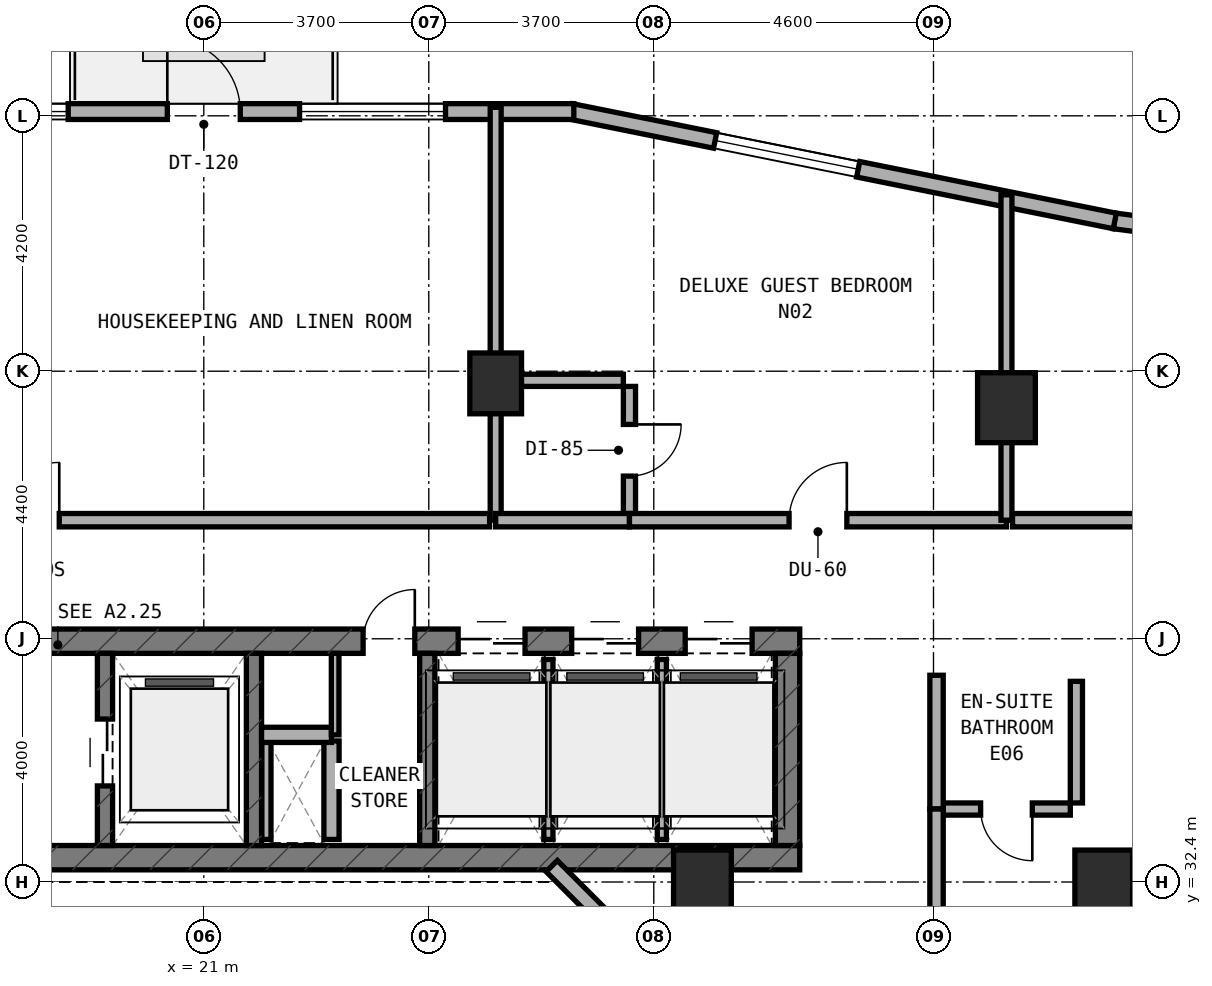
"""IFC4 building model, lengths in metres.
Left out: names, types, materials, properties, quantities, classifications, styles, units other than length and angle.
Written with IfcOpenShell. Run it as: python <this file> out.ifc"""

import sys

from ifc_helpers import new_model, si_unit, direction, frame, frame_2d, origin, origin_2d, place, context, subcontext, project, spatial, rectangle, extrude, element, fill, save


model = new_model("IFC4")
c1 = context("Model", 3, precision=1e-05, world=origin(), true_north=direction((0.0, 1.0)))
c2 = subcontext(c1, "Body", "Model", "MODEL_VIEW")
j1 = project(units=[si_unit("LENGTHUNIT", "METRE"), si_unit("PLANEANGLEUNIT", "RADIAN")], contexts=[c1])
p1 = place(None, origin())
s1 = spatial("IfcSite", under=j1, at=p1, CompositionType="ELEMENT")
p2 = place(p1, origin())
s2 = spatial("IfcBuilding", under=s1, at=p2, CompositionType="ELEMENT")
p3 = place(p2, frame((0.0, 0.0, 112.5)))
s3 = spatial("IfcBuildingStorey", under=s2, at=p3, CompositionType="ELEMENT", Elevation=112.5)
p4 = place(p3, frame((6.4, 32.8, 0.0), z_axis=(0.0, 0.0, 1.0), x_axis=(1.0, 0.0, 0.0)))
e1 = element("IfcWall", 1, at=p4, inside=s3, PredefinedType="SHEAR", context=c2, shape_type="SweptSolid", body=[
    extrude(rectangle(XDim=24.4, YDim=0.4, at=frame_2d((12.2, 0.0))), origin(), (0.0, 0.0, 1.0), 3.5),
])
p5 = place(p4, frame((6.05, 0.0, 0.0)))
e2 = element("IfcOpeningElement", 2, at=p5, cuts=e1, PredefinedType="OPENING", context=c2, shape_type="SweptSolid", body=[
    extrude(rectangle(XDim=1.1, YDim=2.15, at=frame_2d((0.55, 1.075))), frame((0.0, 0.21, 0.0), z_axis=(0.0, -1.0, 0.0), x_axis=(1.0, 0.0, 0.0)), (0.0, 0.0, 1.0), 0.42),
])
p6 = place(p3, frame((6.4, 36.36, 0.0), z_axis=(0.0, 0.0, 1.0), x_axis=(1.0, 0.0, 0.0)))
e3 = element("IfcWall", 3, at=p6, inside=s3, PredefinedType="SHEAR", context=c2, shape_type="SweptSolid", body=[
    extrude(rectangle(XDim=24.4, YDim=0.4, at=frame_2d((12.2, 0.0))), origin(), (0.0, 0.0, 1.0), 3.5),
])
p7 = place(p6, frame((9.15, 0.0, 0.0)))
e4 = element("IfcOpeningElement", 4, at=p7, cuts=e3, PredefinedType="OPENING", context=c2, shape_type="SweptSolid", body=[
    extrude(rectangle(XDim=1.2, YDim=2.15, at=frame_2d((0.6, 1.075))), frame((0.0, 0.21, 0.0), z_axis=(0.0, -1.0, 0.0), x_axis=(1.0, 0.0, 0.0)), (0.0, 0.0, 1.0), 0.42),
])
p8 = place(p6, frame((17.22, 0.0, 0.0)))
e5 = element("IfcOpeningElement", 5, at=p8, cuts=e3, PredefinedType="OPENING", context=c2, shape_type="SweptSolid", body=[
    extrude(rectangle(XDim=0.85, YDim=2.1, at=frame_2d((0.425, 1.05))), frame((0.0, 0.21, 0.0), z_axis=(0.0, -1.0, 0.0), x_axis=(1.0, 0.0, 0.0)), (0.0, 0.0, 1.0), 0.42),
])
p9 = place(p6, frame((18.783, 0.0, 0.0)))
e6 = element("IfcOpeningElement", 6, at=p9, cuts=e3, PredefinedType="OPENING", context=c2, shape_type="SweptSolid", body=[
    extrude(rectangle(XDim=1.1, YDim=2.15, at=frame_2d((0.55, 1.075))), frame((0.0, 0.21, 0.0), z_axis=(0.0, -1.0, 0.0), x_axis=(1.0, 0.0, 0.0)), (0.0, 0.0, 1.0), 0.42),
])
p10 = place(p6, frame((20.65, 0.0, 0.0)))
e7 = element("IfcOpeningElement", 7, at=p10, cuts=e3, PredefinedType="OPENING", context=c2, shape_type="SweptSolid", body=[
    extrude(rectangle(XDim=1.1, YDim=2.15, at=frame_2d((0.55, 1.075))), frame((0.0, 0.21, 0.0), z_axis=(0.0, -1.0, 0.0), x_axis=(1.0, 0.0, 0.0)), (0.0, 0.0, 1.0), 0.42),
])
p11 = place(p6, frame((22.517, 0.0, 0.0)))
e8 = element("IfcOpeningElement", 8, at=p11, cuts=e3, PredefinedType="OPENING", context=c2, shape_type="SweptSolid", body=[
    extrude(rectangle(XDim=1.1, YDim=2.15, at=frame_2d((0.55, 1.075))), frame((0.0, 0.21, 0.0), z_axis=(0.0, -1.0, 0.0), x_axis=(1.0, 0.0, 0.0)), (0.0, 0.0, 1.0), 0.42),
])
p12 = place(p3, frame((30.6, 33.0, 0.0), z_axis=(0.0, 0.0, 1.0), x_axis=(0.0, 1.0, 0.0)))
e9 = element("IfcWall", 9, at=p12, inside=s3, PredefinedType="SHEAR", context=c2, shape_type="SweptSolid", body=[
    extrude(rectangle(XDim=3.16, YDim=0.4, at=frame_2d((1.58, 0.0))), origin(), (0.0, 0.0, 1.0), 3.5),
])
p13 = place(p3, frame((19.375, 33.0, 0.0), z_axis=(0.0, 0.0, 1.0), x_axis=(0.0, 1.0, 0.0)))
e10 = element("IfcWall", 10, at=p13, inside=s3, PredefinedType="STANDARD", context=c2, shape_type="SweptSolid", body=[
    extrude(rectangle(XDim=3.16, YDim=0.25, at=frame_2d((1.58, 0.0))), origin(), (0.0, 0.0, 1.0), 3.22),
])
p14 = place(p13, frame((0.98, 0.0, 0.0)))
e11 = element("IfcOpeningElement", 11, at=p14, cuts=e10, PredefinedType="OPENING", context=c2, shape_type="SweptSolid", body=[
    extrude(rectangle(XDim=1.1, YDim=2.15, at=frame_2d((0.55, 1.075))), frame((0.0, 0.135, 0.0), z_axis=(0.0, -1.0, 0.0), x_axis=(1.0, 0.0, 0.0)), (0.0, 0.0, 1.0), 0.27),
])
for number, where, z_axis, x_axis in (
    (12, (21.825, 33.0, 0.0), (0.0, 0.0, 1.0), (0.0, 1.0, 0.0)),
    (13, (24.675, 33.0, 0.0), (0.0, 0.0, 1.0), (0.0, 1.0, 0.0)),
):
    element("IfcWall", number, at=place(p3, frame(where, z_axis=z_axis, x_axis=x_axis)), inside=s3, PredefinedType="STANDARD", context=c2, shape_type="SweptSolid", body=[
        extrude(rectangle(XDim=3.16, YDim=0.25, at=frame_2d((1.58, 0.0))), origin(), (0.0, 0.0, 1.0), 3.22),
    ])
p15 = place(p3, frame((25.8, 40.6, 0.0), z_axis=(0.0, 0.0, 1.0), x_axis=(1.0, 0.0, 0.0)))
e14 = element("IfcColumn", 14, at=p15, inside=s3, PredefinedType="COLUMN", context=c2, shape_type="SweptSolid", body=[
    extrude(rectangle(XDim=0.85, YDim=1.0, at=origin_2d()), origin(), (0.0, 0.0, 1.0), 3.5),
])
for number, where, z_axis, x_axis in (
    (15, (34.2, 40.2, 0.0), (0.0, 0.0, 1.0), (1.0, 0.0, 0.0)),
    (16, (35.8, 32.35, 0.0), (0.0, 0.0, 1.0), (1.0, 0.0, 0.0)),
    (17, (29.2, 32.35, 0.0), (0.0, 0.0, 1.0), (1.0, 0.0, 0.0)),
):
    element("IfcColumn", number, at=place(p3, frame(where, z_axis=z_axis, x_axis=x_axis)), inside=s3, PredefinedType="COLUMN", context=c2, shape_type="SweptSolid", body=[
        extrude(rectangle(XDim=0.95, YDim=1.15, at=origin_2d()), origin(), (0.0, 0.0, 1.0), 3.5),
    ])
p16 = place(p3, frame((36.888, 43.152, 0.0), z_axis=(0.0, 0.0, 1.0), x_axis=(-0.991487658083, 0.130200706103, 0.0)))
e18 = element("IfcWall", 18, at=p16, inside=s3, PredefinedType="STANDARD", context=c2, shape_type="SweptSolid", body=[
    extrude(rectangle(XDim=0.921, YDim=0.26, at=frame_2d((0.46, 0.0))), origin(), (0.0, 0.0, 1.0), 3.22),
])
p17 = place(p3, frame((35.982, 43.271, 0.0), z_axis=(0.0, 0.0, 1.0), x_axis=(-0.980317172899, 0.197429077186, 0.0)))
e19 = element("IfcWall", 19, at=p17, inside=s3, PredefinedType="STANDARD", context=c2, shape_type="SweptSolid", body=[
    extrude(rectangle(XDim=9.117, YDim=0.26, at=frame_2d((4.559, 0.0))), origin(), (0.0, 0.0, 1.0), 3.22),
])
p18 = place(p17, frame((4.305, 0.0, 0.8)))
e20 = element("IfcOpeningElement", 20, at=p18, cuts=e19, PredefinedType="OPENING", context=c2, shape_type="SweptSolid", body=[
    extrude(rectangle(XDim=2.4, YDim=1.6, at=frame_2d((1.2, 0.8))), frame((0.0, 0.14, 0.0), z_axis=(0.0, -1.0, 0.0), x_axis=(1.0, 0.0, 0.0)), (0.0, 0.0, 1.0), 0.28),
])
p19 = place(p3, frame((27.085, 45.07, 0.0), z_axis=(0.0, 0.0, 1.0), x_axis=(-1.0, 0.0, 0.0)))
e21 = element("IfcWall", 21, at=p19, inside=s3, PredefinedType="STANDARD", context=c2, shape_type="SweptSolid", body=[
    extrude(rectangle(XDim=12.135, YDim=0.26, at=frame_2d((6.067, 0.0))), origin(), (0.0, 0.0, 1.0), 3.22),
])
p20 = place(p19, frame((5.485, 0.0, 0.0)))
e22 = element("IfcOpeningElement", 22, at=p20, cuts=e21, PredefinedType="OPENING", context=c2, shape_type="SweptSolid", body=[
    extrude(rectangle(XDim=1.2, YDim=2.15, at=frame_2d((0.6, 1.075))), frame((0.0, 0.14, 0.0), z_axis=(0.0, -1.0, 0.0), x_axis=(1.0, 0.0, 0.0)), (0.0, 0.0, 1.0), 0.28),
])
p21 = place(p19, frame((2.11, 0.0, 0.8)))
e23 = element("IfcOpeningElement", 23, at=p21, cuts=e21, PredefinedType="OPENING", context=c2, shape_type="SweptSolid", body=[
    extrude(rectangle(XDim=2.4, YDim=1.6, at=frame_2d((1.2, 0.8))), frame((0.0, 0.14, 0.0), z_axis=(0.0, -1.0, 0.0), x_axis=(1.0, 0.0, 0.0)), (0.0, 0.0, 1.0), 0.28),
])
p22 = place(p19, frame((8.315, 0.0, 0.8)))
e24 = element("IfcOpeningElement", 24, at=p22, cuts=e21, PredefinedType="OPENING", context=c2, shape_type="SweptSolid", body=[
    extrude(rectangle(XDim=2.4, YDim=1.6, at=frame_2d((1.2, 0.8))), frame((0.0, 0.14, 0.0), z_axis=(0.0, -1.0, 0.0), x_axis=(1.0, 0.0, 0.0)), (0.0, 0.0, 1.0), 0.28),
])
p23 = place(p3, frame((28.556, 30.828, 0.0), z_axis=(0.0, 0.0, 1.0), x_axis=(-0.707059717605, 0.707153841636, 0.0)))
e25 = element("IfcWall", 25, at=p23, inside=s3, PredefinedType="STANDARD", context=c2, shape_type="SweptSolid", body=[
    extrude(rectangle(XDim=2.594, YDim=0.26, at=frame_2d((1.297, 0.0))), origin(), (0.0, 0.0, 1.0), 3.22),
])
p24 = place(p3, frame((22.03, 33.1, 0.0), z_axis=(0.0, 0.0, 1.0), x_axis=(0.0, 1.0, 0.0)))
e26 = element("IfcWall", 26, at=p24, inside=s3, PredefinedType="PARTITIONING", context=c2, shape_type="SweptSolid", body=[
    extrude(rectangle(XDim=1.62, YDim=0.15, at=frame_2d((0.81, 0.0))), origin(), (0.0, 0.0, 1.0), 3.22),
])
p25 = place(p3, frame((23.1, 33.1, 0.0), z_axis=(0.0, 0.0, 1.0), x_axis=(0.0, 1.0, 0.0)))
e27 = element("IfcWall", 27, at=p25, inside=s3, PredefinedType="SOLIDWALL", context=c2, shape_type="SweptSolid", body=[
    extrude(rectangle(XDim=1.62, YDim=0.25, at=frame_2d((0.81, 0.0))), origin(), (0.0, 0.0, 1.0), 3.22),
])
p26 = place(p3, frame((21.95, 34.82, 0.0), z_axis=(0.0, 0.0, 1.0), x_axis=(1.0, 0.0, 0.0)))
e28 = element("IfcWall", 28, at=p26, inside=s3, PredefinedType="SOLIDWALL", context=c2, shape_type="SweptSolid", body=[
    extrude(rectangle(XDim=1.15, YDim=0.25, at=frame_2d((0.575, 0.0))), origin(), (0.0, 0.0, 1.0), 3.22),
])
p27 = place(p3, frame((23.16, 34.82, 0.0), z_axis=(0.0, 0.0, 1.0), x_axis=(0.0, 1.0, 0.0)))
e29 = element("IfcWall", 29, at=p27, inside=s3, PredefinedType="PARTITIONING", context=c2, shape_type="SweptSolid", body=[
    extrude(rectangle(XDim=1.34, YDim=0.125, at=frame_2d((0.67, 0.0))), origin(), (0.0, 0.0, 1.0), 3.22),
])
p28 = place(p3, frame((26.667, 33.1, 0.0), z_axis=(0.0, 0.0, 1.0), x_axis=(0.0, 1.0, 0.0)))
e30 = element("IfcWall", 30, at=p28, inside=s3, PredefinedType="PARTITIONING", context=c2, shape_type="SweptSolid", body=[
    extrude(rectangle(XDim=2.96, YDim=0.15, at=frame_2d((1.48, 0.0))), origin(), (0.0, 0.0, 1.0), 3.22),
])
p29 = place(p3, frame((28.533, 33.1, 0.0), z_axis=(0.0, 0.0, 1.0), x_axis=(0.0, 1.0, 0.0)))
e31 = element("IfcWall", 31, at=p29, inside=s3, PredefinedType="PARTITIONING", context=c2, shape_type="SweptSolid", body=[
    extrude(rectangle(XDim=2.96, YDim=0.15, at=frame_2d((1.48, 0.0))), origin(), (0.0, 0.0, 1.0), 2.695),
])
p30 = place(p3, frame((11.9, 38.35, 0.0), z_axis=(0.0, 0.0, 1.0), x_axis=(1.0, 0.0, 0.0)))
e32 = element("IfcWall", 32, at=p30, inside=s3, PredefinedType="SOLIDWALL", context=c2, shape_type="SweptSolid", body=[
    extrude(rectangle(XDim=13.8, YDim=0.22, at=frame_2d((6.9, 0.0))), origin(), (0.0, 0.0, 1.0), 2.695),
])
p31 = place(p30, frame((5.773, 0.0, 0.0)))
e33 = element("IfcOpeningElement", 33, at=p31, cuts=e32, PredefinedType="OPENING", context=c2, shape_type="SweptSolid", body=[
    extrude(rectangle(XDim=0.95, YDim=2.1, at=frame_2d((0.475, 1.05))), frame((0.0, 0.12, 0.0), z_axis=(0.0, -1.0, 0.0), x_axis=(1.0, 0.0, 0.0)), (0.0, 0.0, 1.0), 0.24),
])
p32 = place(p3, frame((25.8, 38.35, 0.0), z_axis=(0.0, 0.0, 1.0), x_axis=(0.0, 1.0, 0.0)))
e34 = element("IfcWall", 34, at=p32, inside=s3, PredefinedType="SOLIDWALL", context=c2, shape_type="SweptSolid", body=[
    extrude(rectangle(XDim=6.79, YDim=0.18, at=frame_2d((3.395, 0.0))), origin(), (0.0, 0.0, 1.0), 2.695),
])
p33 = place(p3, frame((28.0, 38.45, 0.0), z_axis=(0.0, 0.0, 1.0), x_axis=(0.0, 1.0, 0.0)))
e35 = element("IfcWall", 35, at=p33, inside=s3, PredefinedType="PLUMBINGWALL", context=c2, shape_type="SweptSolid", body=[
    extrude(rectangle(XDim=2.1, YDim=0.2, at=frame_2d((1.05, 0.0))), origin(), (0.0, 0.0, 1.0), 2.835),
])
p34 = place(p33, frame((0.625, 0.0, 0.0)))
e36 = element("IfcOpeningElement", 36, at=p34, cuts=e35, PredefinedType="OPENING", context=c2, shape_type="SweptSolid", body=[
    extrude(rectangle(XDim=0.85, YDim=2.1, at=frame_2d((0.425, 1.05))), frame((0.0, 0.11, 0.0), z_axis=(0.0, -1.0, 0.0), x_axis=(1.0, 0.0, 0.0)), (0.0, 0.0, 1.0), 0.22),
])
p35 = place(p3, frame((25.9, 40.65, 0.0), z_axis=(0.0, 0.0, 1.0), x_axis=(1.0, 0.0, 0.0)))
e37 = element("IfcWall", 37, at=p35, inside=s3, PredefinedType="PLUMBINGWALL", context=c2, shape_type="SweptSolid", body=[
    extrude(rectangle(XDim=2.0, YDim=0.2, at=frame_2d((1.0, 0.0))), origin(), (0.0, 0.0, 1.0), 2.835),
])
p36 = place(p3, frame((25.8, 38.35, 0.0), z_axis=(0.0, 0.0, 1.0), x_axis=(1.0, 0.0, 0.0)))
e38 = element("IfcWall", 38, at=p36, inside=s3, PredefinedType="SOLIDWALL", context=c2, shape_type="SweptSolid", body=[
    extrude(rectangle(XDim=2.2, YDim=0.22, at=frame_2d((1.1, 0.0))), origin(), (0.0, 0.0, 1.0), 2.695),
])
p37 = place(p3, frame((28.0, 38.35, 0.0), z_axis=(0.0, 0.0, 1.0), x_axis=(1.0, 0.0, 0.0)))
e39 = element("IfcWall", 39, at=p37, inside=s3, PredefinedType="SOLIDWALL", context=c2, shape_type="SweptSolid", body=[
    extrude(rectangle(XDim=6.2, YDim=0.22, at=frame_2d((3.1, 0.0))), origin(), (0.0, 0.0, 1.0), 2.695),
])
p38 = place(p37, frame((2.625, 0.0, 0.0)))
e40 = element("IfcOpeningElement", 40, at=p38, cuts=e39, PredefinedType="OPENING", context=c2, shape_type="SweptSolid", body=[
    extrude(rectangle(XDim=0.95, YDim=2.1, at=frame_2d((0.475, 1.05))), frame((0.0, 0.12, 0.0), z_axis=(0.0, -1.0, 0.0), x_axis=(1.0, 0.0, 0.0)), (0.0, 0.0, 1.0), 0.24),
])
p39 = place(p3, frame((34.2, 38.35, 0.0), z_axis=(0.0, 0.0, 1.0), x_axis=(0.0, 1.0, 0.0)))
e41 = element("IfcWall", 41, at=p39, inside=s3, PredefinedType="SOLIDWALL", context=c2, shape_type="SweptSolid", body=[
    extrude(rectangle(XDim=5.351, YDim=0.18, at=frame_2d((2.675, 0.0))), origin(), (0.0, 0.0, 1.0), 2.695),
])
p40 = place(p3, frame((34.3, 38.35, 0.0), z_axis=(0.0, 0.0, 1.0), x_axis=(1.0, 0.0, 0.0)))
e42 = element("IfcWall", 42, at=p40, inside=s3, PredefinedType="SOLIDWALL", context=c2, shape_type="SweptSolid", body=[
    extrude(rectangle(XDim=6.64, YDim=0.22, at=frame_2d((3.32, 0.0))), origin(), (0.0, 0.0, 1.0), 2.835),
])
p41 = place(p40, frame((2.55, 0.0, 0.0)))
e43 = element("IfcOpeningElement", 43, at=p41, cuts=e42, PredefinedType="OPENING", context=c2, shape_type="SweptSolid", body=[
    extrude(rectangle(XDim=0.95, YDim=2.1, at=frame_2d((0.475, 1.05))), frame((0.0, 0.12, 0.0), z_axis=(0.0, -1.0, 0.0), x_axis=(1.0, 0.0, 0.0)), (0.0, 0.0, 1.0), 0.24),
])
p42 = place(p3, frame((33.15, 33.6, 0.0), z_axis=(0.0, 0.0, 1.0), x_axis=(1.0, 0.0, 0.0)))
e44 = element("IfcWall", 44, at=p42, inside=s3, PredefinedType="PLUMBINGWALL", context=c2, shape_type="SweptSolid", body=[
    extrude(rectangle(XDim=2.1, YDim=0.2, at=frame_2d((1.05, 0.0))), origin(), (0.0, 0.0, 1.0), 3.22),
])
p43 = place(p42, frame((0.625, 0.0, 0.0)))
e45 = element("IfcOpeningElement", 45, at=p43, cuts=e44, PredefinedType="OPENING", context=c2, shape_type="SweptSolid", body=[
    extrude(rectangle(XDim=0.85, YDim=2.1, at=frame_2d((0.425, 1.05))), frame((0.0, 0.11, 0.0), z_axis=(0.0, -1.0, 0.0), x_axis=(1.0, 0.0, 0.0)), (0.0, 0.0, 1.0), 0.22),
])
p44 = place(p3, frame((35.35, 33.7, 0.0), z_axis=(0.0, 0.0, 1.0), x_axis=(0.0, 1.0, 0.0)))
e46 = element("IfcWall", 46, at=p44, inside=s3, PredefinedType="PLUMBINGWALL", context=c2, shape_type="SweptSolid", body=[
    extrude(rectangle(XDim=2.0, YDim=0.2, at=frame_2d((1.0, 0.0))), origin(), (0.0, 0.0, 1.0), 2.835),
])
p45 = place(p3, frame((33.05, 33.6, 0.0), z_axis=(0.0, 0.0, 1.0), x_axis=(0.0, 1.0, 0.0)))
e47 = element("IfcWall", 47, at=p45, inside=s3, PredefinedType="SOLIDWALL", context=c2, shape_type="SweptSolid", body=[
    extrude(rectangle(XDim=2.2, YDim=0.22, at=frame_2d((1.1, 0.0))), origin(), (0.0, 0.0, 1.0), 3.22),
])
p46 = place(p3, frame((33.05, 25.77, 0.0), z_axis=(0.0, 0.0, 1.0), x_axis=(0.0, 1.0, 0.0)))
e48 = element("IfcWall", 48, at=p46, inside=s3, PredefinedType="SOLIDWALL", context=c2, shape_type="SweptSolid", body=[
    extrude(rectangle(XDim=7.83, YDim=0.22, at=frame_2d((3.915, 0.0))), origin(), (0.0, 0.0, 1.0), 2.695),
])
p47 = place(p46, frame((3.44, 0.0, 0.0)))
e49 = element("IfcOpeningElement", 49, at=p47, cuts=e48, PredefinedType="OPENING", context=c2, shape_type="SweptSolid", body=[
    extrude(rectangle(XDim=0.95, YDim=2.1, at=frame_2d((0.475, 1.05))), frame((0.0, 0.12, 0.0), z_axis=(0.0, -1.0, 0.0), x_axis=(1.0, 0.0, 0.0)), (0.0, 0.0, 1.0), 0.24),
])
p48 = place(p18, origin())
e50 = element("IfcWindow", 50, at=p48, inside=s3, PartitioningType="SINGLE_PANEL", PredefinedType="WINDOW", context=c2, shape_type="SweptSolid", body=[
    extrude(rectangle(XDim=2.4, YDim=1.6, at=frame_2d((1.2, 0.8))), frame((0.0, 0.03, 0.0), z_axis=(0.0, -1.0, 0.0), x_axis=(1.0, 0.0, 0.0)), (0.0, 0.0, 1.0), 0.06),
])
fill(e20, e50)
p49 = place(p20, frame((1.2, 0.0, 0.0), z_axis=(0.0, 0.0, 1.0), x_axis=(-1.0, 0.0, 0.0)))
e51 = element("IfcDoor", 51, at=p49, inside=s3, OperationType="SINGLE_SWING_LEFT", PredefinedType="DOOR", context=c2, shape_type="SweptSolid", body=[
    extrude(rectangle(XDim=1.2, YDim=2.15, at=frame_2d((0.6, 1.075))), frame((0.0, 0.025, 0.0), z_axis=(0.0, -1.0, 0.0), x_axis=(1.0, 0.0, 0.0)), (0.0, 0.0, 1.0), 0.05),
])
fill(e22, e51)
p50 = place(p21, origin())
e52 = element("IfcWindow", 52, at=p50, inside=s3, PartitioningType="SINGLE_PANEL", PredefinedType="WINDOW", context=c2, shape_type="SweptSolid", body=[
    extrude(rectangle(XDim=2.4, YDim=1.6, at=frame_2d((1.2, 0.8))), frame((0.0, 0.03, 0.0), z_axis=(0.0, -1.0, 0.0), x_axis=(1.0, 0.0, 0.0)), (0.0, 0.0, 1.0), 0.06),
])
fill(e23, e52)
p51 = place(p22, origin())
e53 = element("IfcWindow", 53, at=p51, inside=s3, PartitioningType="SINGLE_PANEL", PredefinedType="WINDOW", context=c2, shape_type="SweptSolid", body=[
    extrude(rectangle(XDim=2.4, YDim=1.6, at=frame_2d((1.2, 0.8))), frame((0.0, 0.03, 0.0), z_axis=(0.0, -1.0, 0.0), x_axis=(1.0, 0.0, 0.0)), (0.0, 0.0, 1.0), 0.06),
])
fill(e24, e53)
p52 = place(p14, origin())
e54 = element("IfcDoor", 54, at=p52, inside=s3, OperationType="DOUBLE_DOOR_SLIDING", PredefinedType="DOOR", context=c2, shape_type="SweptSolid", body=[
    extrude(rectangle(XDim=1.1, YDim=2.15, at=frame_2d((0.55, 1.075))), frame((0.0, 0.025, 0.0), z_axis=(0.0, -1.0, 0.0), x_axis=(1.0, 0.0, 0.0)), (0.0, 0.0, 1.0), 0.05),
])
fill(e11, e54)
p53 = place(p8, origin())
e55 = element("IfcDoor", 55, at=p53, inside=s3, OperationType="SINGLE_SWING_RIGHT", PredefinedType="DOOR", context=c2, shape_type="SweptSolid", body=[
    extrude(rectangle(XDim=0.85, YDim=2.1, at=frame_2d((0.425, 1.05))), frame((0.0, 0.025, 0.0), z_axis=(0.0, -1.0, 0.0), x_axis=(1.0, 0.0, 0.0)), (0.0, 0.0, 1.0), 0.05),
])
fill(e5, e55)
p54 = place(p9, origin())
e56 = element("IfcDoor", 56, at=p54, inside=s3, OperationType="DOUBLE_DOOR_SLIDING", PredefinedType="DOOR", context=c2, shape_type="SweptSolid", body=[
    extrude(rectangle(XDim=1.1, YDim=2.15, at=frame_2d((0.55, 1.075))), frame((0.0, 0.025, 0.0), z_axis=(0.0, -1.0, 0.0), x_axis=(1.0, 0.0, 0.0)), (0.0, 0.0, 1.0), 0.05),
])
fill(e6, e56)
p55 = place(p10, origin())
e57 = element("IfcDoor", 57, at=p55, inside=s3, OperationType="DOUBLE_DOOR_SLIDING", PredefinedType="DOOR", context=c2, shape_type="SweptSolid", body=[
    extrude(rectangle(XDim=1.1, YDim=2.15, at=frame_2d((0.55, 1.075))), frame((0.0, 0.025, 0.0), z_axis=(0.0, -1.0, 0.0), x_axis=(1.0, 0.0, 0.0)), (0.0, 0.0, 1.0), 0.05),
])
fill(e7, e57)
p56 = place(p11, origin())
e58 = element("IfcDoor", 58, at=p56, inside=s3, OperationType="DOUBLE_DOOR_SLIDING", PredefinedType="DOOR", context=c2, shape_type="SweptSolid", body=[
    extrude(rectangle(XDim=1.1, YDim=2.15, at=frame_2d((0.55, 1.075))), frame((0.0, 0.025, 0.0), z_axis=(0.0, -1.0, 0.0), x_axis=(1.0, 0.0, 0.0)), (0.0, 0.0, 1.0), 0.05),
])
fill(e8, e58)
p57 = place(p31, origin())
e59 = element("IfcDoor", 59, at=p57, inside=s3, OperationType="SINGLE_SWING_RIGHT", PredefinedType="DOOR", context=c2, shape_type="SweptSolid", body=[
    extrude(rectangle(XDim=0.95, YDim=2.1, at=frame_2d((0.475, 1.05))), frame((0.0, 0.025, 0.0), z_axis=(0.0, -1.0, 0.0), x_axis=(1.0, 0.0, 0.0)), (0.0, 0.0, 1.0), 0.05),
])
fill(e33, e59)
p58 = place(p34, frame((0.85, 0.0, 0.0), z_axis=(0.0, 0.0, 1.0), x_axis=(-1.0, 0.0, 0.0)))
e60 = element("IfcDoor", 60, at=p58, inside=s3, OperationType="SINGLE_SWING_LEFT", PredefinedType="DOOR", context=c2, shape_type="SweptSolid", body=[
    extrude(rectangle(XDim=0.85, YDim=2.1, at=frame_2d((0.425, 1.05))), frame((0.0, 0.025, 0.0), z_axis=(0.0, -1.0, 0.0), x_axis=(1.0, 0.0, 0.0)), (0.0, 0.0, 1.0), 0.05),
])
fill(e36, e60)
p59 = place(p38, origin())
e61 = element("IfcDoor", 61, at=p59, inside=s3, OperationType="SINGLE_SWING_RIGHT", PredefinedType="DOOR", context=c2, shape_type="SweptSolid", body=[
    extrude(rectangle(XDim=0.95, YDim=2.1, at=frame_2d((0.475, 1.05))), frame((0.0, 0.025, 0.0), z_axis=(0.0, -1.0, 0.0), x_axis=(1.0, 0.0, 0.0)), (0.0, 0.0, 1.0), 0.05),
])
fill(e40, e61)
p60 = place(p43, frame((0.85, 0.0, 0.0), z_axis=(0.0, 0.0, 1.0), x_axis=(-1.0, 0.0, 0.0)))
e62 = element("IfcDoor", 62, at=p60, inside=s3, OperationType="SINGLE_SWING_LEFT", PredefinedType="DOOR", context=c2, shape_type="SweptSolid", body=[
    extrude(rectangle(XDim=0.85, YDim=2.1, at=frame_2d((0.425, 1.05))), frame((0.0, 0.025, 0.0), z_axis=(0.0, -1.0, 0.0), x_axis=(1.0, 0.0, 0.0)), (0.0, 0.0, 1.0), 0.05),
])
fill(e45, e62)
save(model, sys.argv[1])
